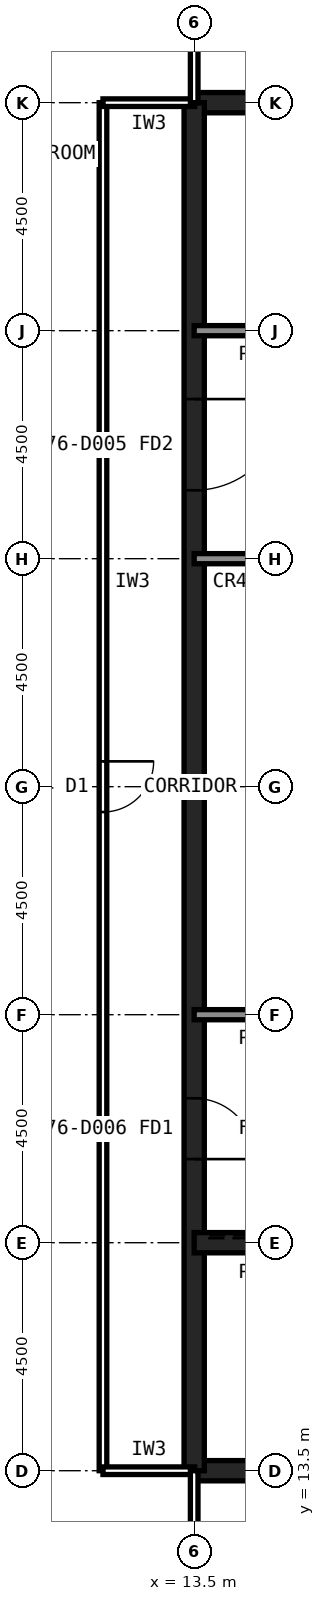
"""IFC4 building model, lengths in metres.
Left out: names, types, materials, properties, quantities, classifications, styles, units other than length and angle.
Written with IfcOpenShell. Run it as: python <this file> out.ifc"""

import sys

from ifc_helpers import new_model, si_unit, direction, frame, frame_2d, origin, place, context, subcontext, project, spatial, polyline, rectangle, outline, extrude, element, fill, save


model = new_model("IFC4")
c1 = context("Model", 3, precision=1e-05, world=origin(), true_north=direction((0.0, 1.0)))
c2 = subcontext(c1, "Body", "Model", "MODEL_VIEW")
j1 = project(units=[si_unit("LENGTHUNIT", "METRE"), si_unit("PLANEANGLEUNIT", "RADIAN")], contexts=[c1])
p1 = place(None, origin())
s1 = spatial("IfcSite", under=j1, at=p1, CompositionType="ELEMENT")
p2 = place(p1, origin())
s2 = spatial("IfcBuilding", under=s1, at=p2, CompositionType="ELEMENT")
p3 = place(p2, frame((0.0, 0.0, 320.1)))
s3 = spatial("IfcBuildingStorey", under=s2, at=p3, CompositionType="ELEMENT", Elevation=320.1)
p4 = place(p3, frame((13.5, 13.5, 0.0), z_axis=(0.0, 0.0, 1.0), x_axis=(1.0, 0.0, 0.0)))
e1 = element("IfcWall", 1, at=p4, inside=s3, PredefinedType="SHEAR", context=c2, shape_type="SweptSolid", body=[
    extrude(rectangle(XDim=27.0, YDim=0.4, at=frame_2d((13.5, 0.0))), origin(), (0.0, 0.0, 1.0), 9.277),
])
p5 = place(p3, frame((40.5, 40.5, 0.0), z_axis=(0.0, 0.0, 1.0), x_axis=(-1.0, 0.0, 0.0)))
e2 = element("IfcWall", 2, at=p5, inside=s3, PredefinedType="SHEAR", context=c2, shape_type="SweptSolid", body=[
    extrude(rectangle(XDim=27.0, YDim=0.4, at=frame_2d((13.5, 0.0))), origin(), (0.0, 0.0, 1.0), 17.377),
])
p6 = place(p3, frame((13.5, 40.5, 0.0), z_axis=(0.0, 0.0, 1.0), x_axis=(0.0, -1.0, 0.0)))
e3 = element("IfcWall", 3, at=p6, inside=s3, PredefinedType="SHEAR", context=c2, shape_type="SweptSolid", body=[
    extrude(outline(polyline([(0.0, 0.0), (27.0, 0.0), (27.0, 9.277), (0.0, 17.377), (0.0, 0.0)])), frame((0.0, 0.2, 0.0), z_axis=(0.0, -1.0, 0.0), x_axis=(1.0, 0.0, 0.0)), (0.0, 0.0, 1.0), 0.4),
])
p7 = place(p6, frame((19.65, 0.0, 0.0)))
e4 = element("IfcOpeningElement", 4, at=p7, cuts=e3, PredefinedType="OPENING", context=c2, shape_type="SweptSolid", body=[
    extrude(rectangle(XDim=1.2, YDim=2.1, at=frame_2d((0.6, 1.05))), frame((0.0, 0.21, 0.0), z_axis=(0.0, -1.0, 0.0), x_axis=(1.0, 0.0, 0.0)), (0.0, 0.0, 1.0), 0.42),
])
p8 = place(p6, frame((5.85, 0.0, 0.0)))
e5 = element("IfcOpeningElement", 5, at=p8, cuts=e3, PredefinedType="OPENING", context=c2, shape_type="SweptSolid", body=[
    extrude(rectangle(XDim=1.8, YDim=2.1, at=frame_2d((0.9, 1.05))), frame((0.0, 0.21, 0.0), z_axis=(0.0, -1.0, 0.0), x_axis=(1.0, 0.0, 0.0)), (0.0, 0.0, 1.0), 0.42),
])
p9 = place(p3, frame((13.5, 18.0, 0.0), z_axis=(0.0, 0.0, 1.0), x_axis=(1.0, 0.0, 0.0)))
e6 = element("IfcWall", 6, at=p9, inside=s3, PredefinedType="SHEAR", context=c2, shape_type="SweptSolid", body=[
    extrude(rectangle(XDim=27.0, YDim=0.4, at=frame_2d((13.5, 0.0))), origin(), (0.0, 0.0, 1.0), 10.627),
])
p10 = place(p9, frame((24.3, 0.0, 0.0)))
e7 = element("IfcOpeningElement", 7, at=p10, cuts=e6, PredefinedType="OPENING", context=c2, shape_type="SweptSolid", body=[
    extrude(rectangle(XDim=0.9, YDim=2.1, at=frame_2d((0.45, 1.05))), frame((0.0, 0.21, 0.0), z_axis=(0.0, -1.0, 0.0), x_axis=(1.0, 0.0, 0.0)), (0.0, 0.0, 1.0), 0.42),
])
p11 = place(p9, frame((1.6, 0.0, 0.0)))
e8 = element("IfcOpeningElement", 8, at=p11, cuts=e6, PredefinedType="OPENING", context=c2, shape_type="SweptSolid", body=[
    extrude(rectangle(XDim=1.3, YDim=2.2, at=frame_2d((0.65, 1.1))), frame((0.0, 0.21, 0.0), z_axis=(0.0, -1.0, 0.0), x_axis=(1.0, 0.0, 0.0)), (0.0, 0.0, 1.0), 0.42),
])
p12 = place(p3, frame((13.5, 36.0, 0.0), z_axis=(0.0, 0.0, 1.0), x_axis=(1.0, 0.0, 0.0)))
e9 = element("IfcWall", 9, at=p12, inside=s3, PredefinedType="SOLIDWALL", context=c2, shape_type="SweptSolid", body=[
    extrude(rectangle(XDim=27.0, YDim=0.2, at=frame_2d((13.5, 0.0))), origin(), (0.0, 0.0, 1.0), 15.877),
])
p13 = place(p12, frame((1.8, 0.0, 0.0)))
e10 = element("IfcOpeningElement", 10, at=p13, cuts=e9, PredefinedType="OPENING", context=c2, shape_type="SweptSolid", body=[
    extrude(rectangle(XDim=0.9, YDim=2.1, at=frame_2d((0.45, 1.05))), frame((0.0, 0.11, 0.0), z_axis=(0.0, -1.0, 0.0), x_axis=(1.0, 0.0, 0.0)), (0.0, 0.0, 1.0), 0.22),
])
p14 = place(p12, frame((5.55, 0.0, 0.0)))
e11 = element("IfcOpeningElement", 11, at=p14, cuts=e9, PredefinedType="OPENING", context=c2, shape_type="SweptSolid", body=[
    extrude(rectangle(XDim=0.9, YDim=2.1, at=frame_2d((0.45, 1.05))), frame((0.0, 0.11, 0.0), z_axis=(0.0, -1.0, 0.0), x_axis=(1.0, 0.0, 0.0)), (0.0, 0.0, 1.0), 0.22),
])
p15 = place(p12, frame((14.55, 0.0, 0.0)))
e12 = element("IfcOpeningElement", 12, at=p15, cuts=e9, PredefinedType="OPENING", context=c2, shape_type="SweptSolid", body=[
    extrude(rectangle(XDim=0.9, YDim=2.1, at=frame_2d((0.45, 1.05))), frame((0.0, 0.11, 0.0), z_axis=(0.0, -1.0, 0.0), x_axis=(1.0, 0.0, 0.0)), (0.0, 0.0, 1.0), 0.22),
])
p16 = place(p12, frame((17.55, 0.0, 0.0)))
e13 = element("IfcOpeningElement", 13, at=p16, cuts=e9, PredefinedType="OPENING", context=c2, shape_type="SweptSolid", body=[
    extrude(rectangle(XDim=0.9, YDim=2.1, at=frame_2d((0.45, 1.05))), frame((0.0, 0.11, 0.0), z_axis=(0.0, -1.0, 0.0), x_axis=(1.0, 0.0, 0.0)), (0.0, 0.0, 1.0), 0.22),
])
p17 = place(p12, frame((24.1, 0.0, 0.0)))
e14 = element("IfcOpeningElement", 14, at=p17, cuts=e9, PredefinedType="OPENING", context=c2, shape_type="SweptSolid", body=[
    extrude(rectangle(XDim=1.3, YDim=2.2, at=frame_2d((0.65, 1.1))), frame((0.0, 0.11, 0.0), z_axis=(0.0, -1.0, 0.0), x_axis=(1.0, 0.0, 0.0)), (0.0, 0.0, 1.0), 0.22),
])
p18 = place(p3, frame((13.5, 22.5, 0.0), z_axis=(0.0, 0.0, 1.0), x_axis=(1.0, 0.0, 0.0)))
e15 = element("IfcWall", 15, at=p18, inside=s3, PredefinedType="SOLIDWALL", context=c2, shape_type="SweptSolid", body=[
    extrude(rectangle(XDim=27.0, YDim=0.2, at=frame_2d((13.5, 0.0))), origin(), (0.0, 0.0, 1.0), 11.827),
])
p19 = place(p18, frame((1.65, 0.0, 0.0)))
e16 = element("IfcOpeningElement", 16, at=p19, cuts=e15, PredefinedType="OPENING", context=c2, shape_type="SweptSolid", body=[
    extrude(rectangle(XDim=1.2, YDim=2.1, at=frame_2d((0.6, 1.05))), frame((0.0, 0.11, 0.0), z_axis=(0.0, -1.0, 0.0), x_axis=(1.0, 0.0, 0.0)), (0.0, 0.0, 1.0), 0.22),
])
p20 = place(p18, frame((6.025, 0.0, 0.0)))
e17 = element("IfcOpeningElement", 17, at=p20, cuts=e15, PredefinedType="OPENING", context=c2, shape_type="SweptSolid", body=[
    extrude(rectangle(XDim=1.0, YDim=2.1, at=frame_2d((0.5, 1.05))), frame((0.0, 0.11, 0.0), z_axis=(0.0, -1.0, 0.0), x_axis=(1.0, 0.0, 0.0)), (0.0, 0.0, 1.0), 0.22),
])
p21 = place(p18, frame((10.525, 0.0, 0.0)))
e18 = element("IfcOpeningElement", 18, at=p21, cuts=e15, PredefinedType="OPENING", context=c2, shape_type="SweptSolid", body=[
    extrude(rectangle(XDim=1.0, YDim=2.1, at=frame_2d((0.5, 1.05))), frame((0.0, 0.11, 0.0), z_axis=(0.0, -1.0, 0.0), x_axis=(1.0, 0.0, 0.0)), (0.0, 0.0, 1.0), 0.22),
])
p22 = place(p18, frame((19.75, 0.0, 0.0)))
e19 = element("IfcOpeningElement", 19, at=p22, cuts=e15, PredefinedType="OPENING", context=c2, shape_type="SweptSolid", body=[
    extrude(rectangle(XDim=1.0, YDim=2.1, at=frame_2d((0.5, 1.05))), frame((0.0, 0.11, 0.0), z_axis=(0.0, -1.0, 0.0), x_axis=(1.0, 0.0, 0.0)), (0.0, 0.0, 1.0), 0.22),
])
p23 = place(p18, frame((15.05, 0.0, 0.0)))
e20 = element("IfcOpeningElement", 20, at=p23, cuts=e15, PredefinedType="OPENING", context=c2, shape_type="SweptSolid", body=[
    extrude(rectangle(XDim=1.4, YDim=2.4, at=frame_2d((0.7, 1.2))), frame((0.0, 0.11, 0.0), z_axis=(0.0, -1.0, 0.0), x_axis=(1.0, 0.0, 0.0)), (0.0, 0.0, 1.0), 0.22),
])
p24 = place(p3, frame((13.5, 31.5, 0.0), z_axis=(0.0, 0.0, 1.0), x_axis=(1.0, 0.0, 0.0)))
e21 = element("IfcWall", 21, at=p24, inside=s3, PredefinedType="SOLIDWALL", context=c2, shape_type="SweptSolid", body=[
    extrude(rectangle(XDim=27.0, YDim=0.2, at=frame_2d((13.5, 0.0))), origin(), (0.0, 0.0, 1.0), 14.527),
])
p25 = place(p24, frame((24.15, 0.0, 0.0)))
e22 = element("IfcOpeningElement", 22, at=p25, cuts=e21, PredefinedType="OPENING", context=c2, shape_type="SweptSolid", body=[
    extrude(rectangle(XDim=1.2, YDim=2.1, at=frame_2d((0.6, 1.05))), frame((0.0, 0.11, 0.0), z_axis=(0.0, -1.0, 0.0), x_axis=(1.0, 0.0, 0.0)), (0.0, 0.0, 1.0), 0.22),
])
p26 = place(p24, frame((15.3, 0.0, 0.0)))
e23 = element("IfcOpeningElement", 23, at=p26, cuts=e21, PredefinedType="OPENING", context=c2, shape_type="SweptSolid", body=[
    extrude(rectangle(XDim=0.9, YDim=2.1, at=frame_2d((0.45, 1.05))), frame((0.0, 0.11, 0.0), z_axis=(0.0, -1.0, 0.0), x_axis=(1.0, 0.0, 0.0)), (0.0, 0.0, 1.0), 0.22),
])
p27 = place(p24, frame((19.8, 0.0, 0.0)))
e24 = element("IfcOpeningElement", 24, at=p27, cuts=e21, PredefinedType="OPENING", context=c2, shape_type="SweptSolid", body=[
    extrude(rectangle(XDim=0.9, YDim=2.1, at=frame_2d((0.45, 1.05))), frame((0.0, 0.11, 0.0), z_axis=(0.0, -1.0, 0.0), x_axis=(1.0, 0.0, 0.0)), (0.0, 0.0, 1.0), 0.22),
])
p28 = place(p3, frame((17.739, -0.63, 0.0), z_axis=(0.0, 0.0, 1.0), x_axis=(-0.707106781187, 0.707106781187, 0.0)))
e25 = element("IfcWall", 25, at=p28, inside=s3, PredefinedType="SOLIDWALL", context=c2, shape_type="SweptSolid", body=[
    extrude(outline(polyline([(0.0, 0.0), (25.978, 0.0), (25.978, 12.722), (0.0, 7.211), (0.0, 0.0)])), frame((0.0, 0.15, 0.0), z_axis=(0.0, -1.0, 0.0), x_axis=(1.0, 0.0, 0.0)), (0.0, 0.0, 1.0), 0.3),
])
p29 = place(p28, frame((0.424, 0.0, 1.2)))
e26 = element("IfcOpeningElement", 26, at=p29, cuts=e25, PredefinedType="OPENING", context=c2, shape_type="SweptSolid", body=[
    extrude(rectangle(XDim=2.4, YDim=2.4, at=frame_2d((1.2, 1.2))), frame((0.0, 0.16, 0.0), z_axis=(0.0, -1.0, 0.0), x_axis=(1.0, 0.0, 0.0)), (0.0, 0.0, 1.0), 0.32),
])
p30 = place(p28, frame((3.671, 0.0, 1.2)))
e27 = element("IfcOpeningElement", 27, at=p30, cuts=e25, PredefinedType="OPENING", context=c2, shape_type="SweptSolid", body=[
    extrude(rectangle(XDim=2.4, YDim=2.4, at=frame_2d((1.2, 1.2))), frame((0.0, 0.16, 0.0), z_axis=(0.0, -1.0, 0.0), x_axis=(1.0, 0.0, 0.0)), (0.0, 0.0, 1.0), 0.32),
])
p31 = place(p28, frame((6.918, 0.0, 1.2)))
e28 = element("IfcOpeningElement", 28, at=p31, cuts=e25, PredefinedType="OPENING", context=c2, shape_type="SweptSolid", body=[
    extrude(rectangle(XDim=2.4, YDim=2.4, at=frame_2d((1.2, 1.2))), frame((0.0, 0.16, 0.0), z_axis=(0.0, -1.0, 0.0), x_axis=(1.0, 0.0, 0.0)), (0.0, 0.0, 1.0), 0.32),
])
p32 = place(p28, frame((10.165, 0.0, 1.2)))
e29 = element("IfcOpeningElement", 29, at=p32, cuts=e25, PredefinedType="OPENING", context=c2, shape_type="SweptSolid", body=[
    extrude(rectangle(XDim=2.4, YDim=2.4, at=frame_2d((1.2, 1.2))), frame((0.0, 0.16, 0.0), z_axis=(0.0, -1.0, 0.0), x_axis=(1.0, 0.0, 0.0)), (0.0, 0.0, 1.0), 0.32),
])
p33 = place(p28, frame((13.412, 0.0, 5.25)))
e30 = element("IfcOpeningElement", 30, at=p33, cuts=e25, PredefinedType="OPENING", context=c2, shape_type="SweptSolid", body=[
    extrude(rectangle(XDim=2.4, YDim=2.4, at=frame_2d((1.2, 1.2))), frame((0.0, 0.16, 0.0), z_axis=(0.0, -1.0, 0.0), x_axis=(1.0, 0.0, 0.0)), (0.0, 0.0, 1.0), 0.32),
])
p34 = place(p28, frame((16.66, 0.0, 5.35)))
e31 = element("IfcOpeningElement", 31, at=p34, cuts=e25, PredefinedType="OPENING", context=c2, shape_type="SweptSolid", body=[
    extrude(rectangle(XDim=2.4, YDim=2.4, at=frame_2d((1.2, 1.2))), frame((0.0, 0.16, 0.0), z_axis=(0.0, -1.0, 0.0), x_axis=(1.0, 0.0, 0.0)), (0.0, 0.0, 1.0), 0.32),
])
p35 = place(p28, frame((19.907, 0.0, 1.2)))
e32 = element("IfcOpeningElement", 32, at=p35, cuts=e25, PredefinedType="OPENING", context=c2, shape_type="SweptSolid", body=[
    extrude(rectangle(XDim=2.4, YDim=2.4, at=frame_2d((1.2, 1.2))), frame((0.0, 0.16, 0.0), z_axis=(0.0, -1.0, 0.0), x_axis=(1.0, 0.0, 0.0)), (0.0, 0.0, 1.0), 0.32),
])
p36 = place(p28, frame((23.154, 0.0, 1.2)))
e33 = element("IfcOpeningElement", 33, at=p36, cuts=e25, PredefinedType="OPENING", context=c2, shape_type="SweptSolid", body=[
    extrude(rectangle(XDim=2.4, YDim=2.4, at=frame_2d((1.2, 1.2))), frame((0.0, 0.16, 0.0), z_axis=(0.0, -1.0, 0.0), x_axis=(1.0, 0.0, 0.0)), (0.0, 0.0, 1.0), 0.32),
])
p37 = place(p3, frame((-0.63, 36.261, 0.0), z_axis=(0.0, 0.0, 1.0), x_axis=(0.707106781187, 0.707106781187, 0.0)))
e34 = element("IfcWall", 34, at=p37, inside=s3, PredefinedType="SOLIDWALL", context=c2, shape_type="SweptSolid", body=[
    extrude(outline(polyline([(0.0, 0.0), (25.978, 0.0), (25.978, 23.789), (0.0, 18.278), (0.0, 0.0)])), frame((0.0, 0.15, 0.0), z_axis=(0.0, -1.0, 0.0), x_axis=(1.0, 0.0, 0.0)), (0.0, 0.0, 1.0), 0.3),
])
p38 = place(p37, frame((0.424, 0.0, 1.2)))
e35 = element("IfcOpeningElement", 35, at=p38, cuts=e34, PredefinedType="OPENING", context=c2, shape_type="SweptSolid", body=[
    extrude(rectangle(XDim=2.4, YDim=2.4, at=frame_2d((1.2, 1.2))), frame((0.0, 0.16, 0.0), z_axis=(0.0, -1.0, 0.0), x_axis=(1.0, 0.0, 0.0)), (0.0, 0.0, 1.0), 0.32),
])
p39 = place(p37, frame((3.671, 0.0, 1.2)))
e36 = element("IfcOpeningElement", 36, at=p39, cuts=e34, PredefinedType="OPENING", context=c2, shape_type="SweptSolid", body=[
    extrude(rectangle(XDim=2.4, YDim=2.4, at=frame_2d((1.2, 1.2))), frame((0.0, 0.16, 0.0), z_axis=(0.0, -1.0, 0.0), x_axis=(1.0, 0.0, 0.0)), (0.0, 0.0, 1.0), 0.32),
])
p40 = place(p37, frame((6.918, 0.0, 1.2)))
e37 = element("IfcOpeningElement", 37, at=p40, cuts=e34, PredefinedType="OPENING", context=c2, shape_type="SweptSolid", body=[
    extrude(rectangle(XDim=2.4, YDim=2.4, at=frame_2d((1.2, 1.2))), frame((0.0, 0.16, 0.0), z_axis=(0.0, -1.0, 0.0), x_axis=(1.0, 0.0, 0.0)), (0.0, 0.0, 1.0), 0.32),
])
p41 = place(p37, frame((10.165, 0.0, 1.2)))
e38 = element("IfcOpeningElement", 38, at=p41, cuts=e34, PredefinedType="OPENING", context=c2, shape_type="SweptSolid", body=[
    extrude(rectangle(XDim=2.4, YDim=2.4, at=frame_2d((1.2, 1.2))), frame((0.0, 0.16, 0.0), z_axis=(0.0, -1.0, 0.0), x_axis=(1.0, 0.0, 0.0)), (0.0, 0.0, 1.0), 0.32),
])
p42 = place(p37, frame((13.412, 0.0, 11.15)))
e39 = element("IfcOpeningElement", 39, at=p42, cuts=e34, PredefinedType="OPENING", context=c2, shape_type="SweptSolid", body=[
    extrude(rectangle(XDim=2.4, YDim=2.4, at=frame_2d((1.2, 1.2))), frame((0.0, 0.16, 0.0), z_axis=(0.0, -1.0, 0.0), x_axis=(1.0, 0.0, 0.0)), (0.0, 0.0, 1.0), 0.32),
])
p43 = place(p37, frame((16.66, 0.0, 11.3)))
e40 = element("IfcOpeningElement", 40, at=p43, cuts=e34, PredefinedType="OPENING", context=c2, shape_type="SweptSolid", body=[
    extrude(rectangle(XDim=2.4, YDim=2.4, at=frame_2d((1.2, 1.2))), frame((0.0, 0.16, 0.0), z_axis=(0.0, -1.0, 0.0), x_axis=(1.0, 0.0, 0.0)), (0.0, 0.0, 1.0), 0.32),
])
p44 = place(p37, frame((19.907, 0.0, 1.2)))
e41 = element("IfcOpeningElement", 41, at=p44, cuts=e34, PredefinedType="OPENING", context=c2, shape_type="SweptSolid", body=[
    extrude(rectangle(XDim=2.4, YDim=2.4, at=frame_2d((1.2, 1.2))), frame((0.0, 0.16, 0.0), z_axis=(0.0, -1.0, 0.0), x_axis=(1.0, 0.0, 0.0)), (0.0, 0.0, 1.0), 0.32),
])
p45 = place(p37, frame((23.154, 0.0, 1.2)))
e42 = element("IfcOpeningElement", 42, at=p45, cuts=e34, PredefinedType="OPENING", context=c2, shape_type="SweptSolid", body=[
    extrude(rectangle(XDim=2.4, YDim=2.4, at=frame_2d((1.2, 1.2))), frame((0.0, 0.16, 0.0), z_axis=(0.0, -1.0, 0.0), x_axis=(1.0, 0.0, 0.0)), (0.0, 0.0, 1.0), 0.32),
])
p46 = place(p3, frame((11.7, 40.5, 0.0), z_axis=(0.0, 0.0, 1.0), x_axis=(0.0, -1.0, 0.0)))
e43 = element("IfcWall", 43, at=p46, inside=s3, PredefinedType="PARTITIONING", context=c2, shape_type="SweptSolid", body=[
    extrude(rectangle(XDim=27.0, YDim=0.15, at=frame_2d((13.5, 0.0))), origin(), (0.0, 0.0, 1.0), 4.246),
])
p47 = place(p46, frame((13.0, 0.0, 0.0)))
e44 = element("IfcOpeningElement", 44, at=p47, cuts=e43, PredefinedType="OPENING", context=c2, shape_type="SweptSolid", body=[
    extrude(rectangle(XDim=1.0, YDim=2.1, at=frame_2d((0.5, 1.05))), frame((0.0, 0.085, 0.0), z_axis=(0.0, -1.0, 0.0), x_axis=(1.0, 0.0, 0.0)), (0.0, 0.0, 1.0), 0.17),
])
for number, where, z_axis, x_axis in (
    (45, (11.7, 13.5, 0.0), (0.0, 0.0, 1.0), (1.0, 0.0, 0.0)),
    (46, (13.51, 40.5, 0.0), (0.0, 0.0, 1.0), (-1.0, 0.0, 0.0)),
):
    element("IfcWall", number, at=place(p3, frame(where, z_axis=z_axis, x_axis=x_axis)), inside=s3, PredefinedType="PARTITIONING", context=c2, shape_type="SweptSolid", body=[
        extrude(rectangle(XDim=1.81, YDim=0.15, at=frame_2d((0.905, 0.0))), origin(), (0.0, 0.0, 1.0), 4.246),
    ])
p48 = place(p3, frame((13.5, 40.5, 0.0), z_axis=(0.0, 0.0, 1.0), x_axis=(0.0, 1.0, 0.0)))
e47 = element("IfcWall", 47, at=p48, inside=s3, PredefinedType="PARTITIONING", context=c2, shape_type="SweptSolid", body=[
    extrude(rectangle(XDim=8.58, YDim=0.15, at=frame_2d((4.29, 0.0))), origin(), (0.0, 0.0, 1.0), 4.246),
])
p49 = place(p48, frame((3.79, 0.0, 0.0)))
e48 = element("IfcOpeningElement", 48, at=p49, cuts=e47, PredefinedType="OPENING", context=c2, shape_type="SweptSolid", body=[
    extrude(rectangle(XDim=1.0, YDim=2.1, at=frame_2d((0.5, 1.05))), frame((0.0, 0.085, 0.0), z_axis=(0.0, -1.0, 0.0), x_axis=(1.0, 0.0, 0.0)), (0.0, 0.0, 1.0), 0.17),
])
p50 = place(p3, frame((13.5, 4.92, 0.0), z_axis=(0.0, 0.0, 1.0), x_axis=(0.0, 1.0, 0.0)))
e49 = element("IfcWall", 49, at=p50, inside=s3, PredefinedType="PARTITIONING", context=c2, shape_type="SweptSolid", body=[
    extrude(rectangle(XDim=8.58, YDim=0.15, at=frame_2d((4.29, 0.0))), origin(), (0.0, 0.0, 1.0), 4.246),
])
p51 = place(p50, frame((3.79, 0.0, 0.0)))
e50 = element("IfcOpeningElement", 50, at=p51, cuts=e49, PredefinedType="OPENING", context=c2, shape_type="SweptSolid", body=[
    extrude(rectangle(XDim=1.0, YDim=2.1, at=frame_2d((0.5, 1.05))), frame((0.0, 0.085, 0.0), z_axis=(0.0, -1.0, 0.0), x_axis=(1.0, 0.0, 0.0)), (0.0, 0.0, 1.0), 0.17),
])
p52 = place(p7, origin())
e51 = element("IfcDoor", 51, at=p52, inside=s3, OperationType="SINGLE_SWING_RIGHT", PredefinedType="DOOR", context=c2, shape_type="SweptSolid", body=[
    extrude(rectangle(XDim=1.2, YDim=2.1, at=frame_2d((0.6, 1.05))), frame((0.0, 0.025, 0.0), z_axis=(0.0, -1.0, 0.0), x_axis=(1.0, 0.0, 0.0)), (0.0, 0.0, 1.0), 0.05),
])
fill(e4, e51)
p53 = place(p8, origin())
e52 = element("IfcDoor", 52, at=p53, inside=s3, OperationType="SINGLE_SWING_LEFT", PredefinedType="DOOR", context=c2, shape_type="SweptSolid", body=[
    extrude(rectangle(XDim=1.8, YDim=2.1, at=frame_2d((0.9, 1.05))), frame((0.0, 0.025, 0.0), z_axis=(0.0, -1.0, 0.0), x_axis=(1.0, 0.0, 0.0)), (0.0, 0.0, 1.0), 0.05),
])
fill(e5, e52)
p54 = place(p47, origin())
e53 = element("IfcDoor", 53, at=p54, inside=s3, OperationType="SINGLE_SWING_LEFT", PredefinedType="DOOR", context=c2, shape_type="SweptSolid", body=[
    extrude(rectangle(XDim=1.0, YDim=2.1, at=frame_2d((0.5, 1.05))), frame((0.0, 0.025, 0.0), z_axis=(0.0, -1.0, 0.0), x_axis=(1.0, 0.0, 0.0)), (0.0, 0.0, 1.0), 0.05),
])
fill(e44, e53)
save(model, sys.argv[1])
